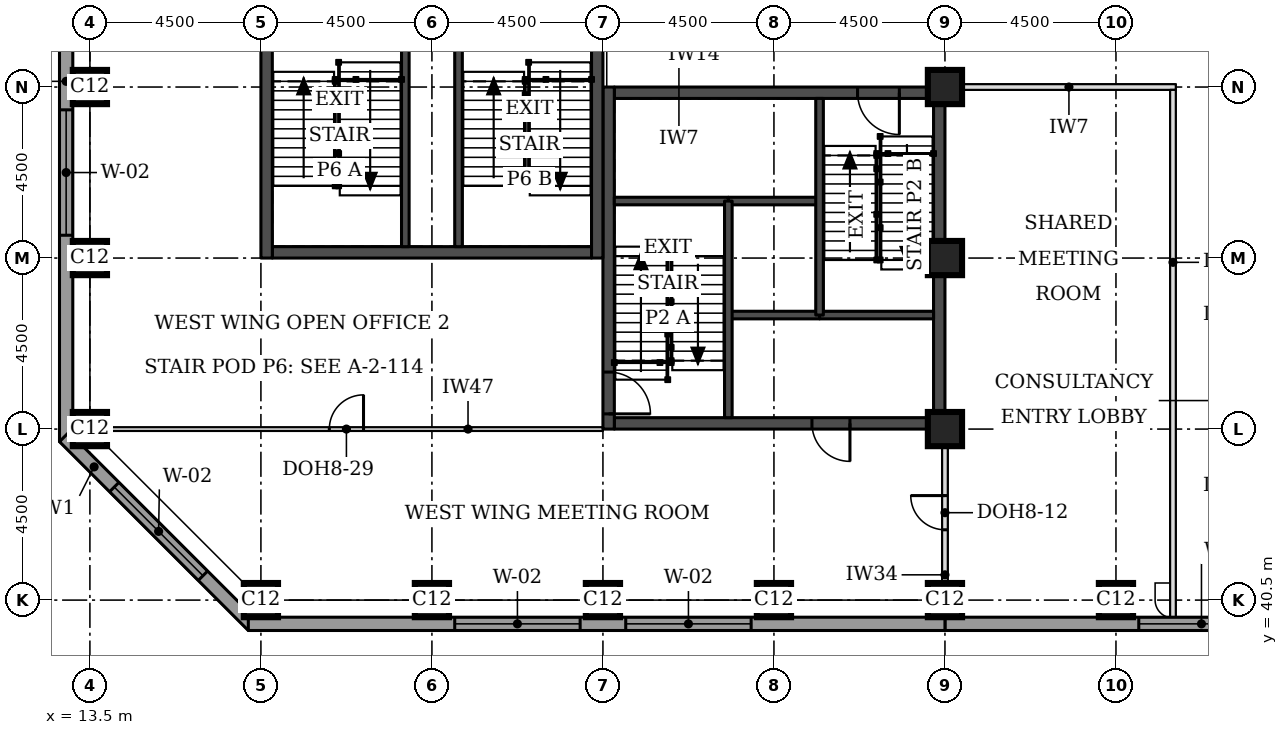
"""IFC4 building model, lengths in metres.
Left out: names, types, materials, properties, quantities, classifications, styles, units other than length and angle.
Written with IfcOpenShell. Run it as: python <this file> out.ifc"""

import sys

from ifc_helpers import new_model, si_unit, direction, frame, frame_2d, origin, origin_2d, place, context, subcontext, project, spatial, rectangle, extrude, element, fill, save


model = new_model("IFC4")
c1 = context("Model", 3, precision=1e-05, world=origin(), true_north=direction((0.0, 1.0)))
c2 = subcontext(c1, "Body", "Model", "MODEL_VIEW")
j1 = project(units=[si_unit("LENGTHUNIT", "METRE"), si_unit("PLANEANGLEUNIT", "RADIAN")], contexts=[c1])
p1 = place(None, origin())
s1 = spatial("IfcSite", under=j1, at=p1, CompositionType="ELEMENT")
p2 = place(p1, origin())
s2 = spatial("IfcBuilding", under=s1, at=p2, CompositionType="ELEMENT")
p3 = place(p2, frame((0.0, 0.0, 199.5)))
s3 = spatial("IfcBuildingStorey", under=s2, at=p3, CompositionType="ELEMENT", Elevation=199.5)
for number, where, z_axis, x_axis in (
    (1, (18.0, 40.5, 0.0), (0.0, 0.0, 1.0), (1.0, 0.0, 0.0)),
    (2, (22.5, 40.5, 0.0), (0.0, 0.0, 1.0), (1.0, 0.0, 0.0)),
    (3, (27.0, 40.5, 0.0), (0.0, 0.0, 1.0), (1.0, 0.0, 0.0)),
    (4, (31.5, 40.5, 0.0), (0.0, 0.0, 1.0), (1.0, 0.0, 0.0)),
    (5, (36.0, 40.5, 0.0), (0.0, 0.0, 1.0), (1.0, 0.0, 0.0)),
    (6, (40.5, 40.5, 0.0), (0.0, 0.0, 1.0), (1.0, 0.0, 0.0)),
    (7, (13.5, 45.0, 0.0), (0.0, 0.0, 1.0), (1.0, 0.0, 0.0)),
    (8, (36.0, 45.0, 0.0), (0.0, 0.0, 1.0), (1.0, 0.0, 0.0)),
    (9, (13.5, 49.5, 0.0), (0.0, 0.0, 1.0), (1.0, 0.0, 0.0)),
    (10, (36.0, 49.5, 0.0), (0.0, 0.0, 1.0), (1.0, 0.0, 0.0)),
    (11, (13.5, 54.0, 0.0), (0.0, 0.0, 1.0), (1.0, 0.0, 0.0)),
    (12, (36.0, 54.0, 0.0), (0.0, 0.0, 1.0), (1.0, 0.0, 0.0)),
):
    element("IfcColumn", number, at=place(p3, frame(where, z_axis=z_axis, x_axis=x_axis)), inside=s3, PredefinedType="COLUMN", context=c2, shape_type="SweptSolid", body=[
        extrude(rectangle(XDim=0.9, YDim=0.9, at=origin_2d()), origin(), (0.0, 0.0, 1.0), 3.7),
    ])
p4 = place(p3, frame((27.3, 45.15, 0.0), z_axis=(0.0, 0.0, 1.0), x_axis=(1.0, 0.0, 0.0)))
e13 = element("IfcWall", 13, at=p4, inside=s3, PredefinedType="SHEAR", context=c2, shape_type="SweptSolid", body=[
    extrude(rectangle(XDim=8.4, YDim=0.3, at=frame_2d((4.2, 0.0))), origin(), (0.0, 0.0, 1.0), 3.7),
])
p5 = place(p4, frame((5.2, 0.0, 0.0)))
e14 = element("IfcOpeningElement", 14, at=p5, cuts=e13, PredefinedType="OPENING", context=c2, shape_type="SweptSolid", body=[
    extrude(rectangle(XDim=1.0, YDim=2.1, at=frame_2d((0.5, 1.05))), frame((0.0, 0.16, 0.0), z_axis=(0.0, -1.0, 0.0), x_axis=(1.0, 0.0, 0.0)), (0.0, 0.0, 1.0), 0.32),
])
p6 = place(p3, frame((27.3, 53.85, 0.0), z_axis=(0.0, 0.0, 1.0), x_axis=(1.0, 0.0, 0.0)))
e15 = element("IfcWall", 15, at=p6, inside=s3, PredefinedType="SHEAR", context=c2, shape_type="SweptSolid", body=[
    extrude(rectangle(XDim=8.4, YDim=0.3, at=frame_2d((4.2, 0.0))), origin(), (0.0, 0.0, 1.0), 3.7),
])
p7 = place(p6, frame((6.4, 0.0, 0.0)))
e16 = element("IfcOpeningElement", 16, at=p7, cuts=e15, PredefinedType="OPENING", context=c2, shape_type="SweptSolid", body=[
    extrude(rectangle(XDim=1.1, YDim=2.1, at=frame_2d((0.55, 1.05))), frame((0.0, 0.16, 0.0), z_axis=(0.0, -1.0, 0.0), x_axis=(1.0, 0.0, 0.0)), (0.0, 0.0, 1.0), 0.32),
])
p8 = place(p3, frame((27.15, 45.0, 0.0), z_axis=(0.0, 0.0, 1.0), x_axis=(0.0, 1.0, 0.0)))
e17 = element("IfcWall", 17, at=p8, inside=s3, PredefinedType="SHEAR", context=c2, shape_type="SweptSolid", body=[
    extrude(rectangle(XDim=9.0, YDim=0.3, at=frame_2d((4.5, 0.0))), origin(), (0.0, 0.0, 1.0), 3.7),
])
p9 = place(p8, frame((0.4, 0.0, 0.0)))
e18 = element("IfcOpeningElement", 18, at=p9, cuts=e17, PredefinedType="OPENING", context=c2, shape_type="SweptSolid", body=[
    extrude(rectangle(XDim=1.1, YDim=2.1, at=frame_2d((0.55, 1.05))), frame((0.0, 0.16, 0.0), z_axis=(0.0, -1.0, 0.0), x_axis=(1.0, 0.0, 0.0)), (0.0, 0.0, 1.0), 0.32),
])
p10 = place(p3, frame((35.85, 45.0, 0.0), z_axis=(0.0, 0.0, 1.0), x_axis=(0.0, 1.0, 0.0)))
e19 = element("IfcWall", 19, at=p10, inside=s3, PredefinedType="SHEAR", context=c2, shape_type="SweptSolid", body=[
    extrude(rectangle(XDim=9.0, YDim=0.3, at=frame_2d((4.5, 0.0))), origin(), (0.0, 0.0, 1.0), 3.7),
])
p11 = place(p3, frame((18.3, 49.65, 0.0), z_axis=(0.0, 0.0, 1.0), x_axis=(1.0, 0.0, 0.0)))
e20 = element("IfcWall", 20, at=p11, inside=s3, PredefinedType="SHEAR", context=c2, shape_type="SweptSolid", body=[
    extrude(rectangle(XDim=8.4, YDim=0.3, at=frame_2d((4.2, 0.0))), origin(), (0.0, 0.0, 1.0), 3.7),
])
p12 = place(p3, frame((18.15, 49.5, 0.0), z_axis=(0.0, 0.0, 1.0), x_axis=(0.0, 1.0, 0.0)))
e21 = element("IfcWall", 21, at=p12, inside=s3, PredefinedType="SHEAR", context=c2, shape_type="SweptSolid", body=[
    extrude(rectangle(XDim=9.0, YDim=0.3, at=frame_2d((4.5, 0.0))), origin(), (0.0, 0.0, 1.0), 3.7),
])
p13 = place(p3, frame((26.85, 49.5, 0.0), z_axis=(0.0, 0.0, 1.0), x_axis=(0.0, 1.0, 0.0)))
e22 = element("IfcWall", 22, at=p13, inside=s3, PredefinedType="SHEAR", context=c2, shape_type="SweptSolid", body=[
    extrude(rectangle(XDim=9.0, YDim=0.3, at=frame_2d((4.5, 0.0))), origin(), (0.0, 0.0, 1.0), 3.7),
])
p14 = place(p13, frame((6.6, 0.0, 0.0)))
e23 = element("IfcOpeningElement", 23, at=p14, cuts=e22, PredefinedType="OPENING", context=c2, shape_type="SweptSolid", body=[
    extrude(rectangle(XDim=1.8, YDim=2.1, at=frame_2d((0.9, 1.05))), frame((0.0, 0.16, 0.0), z_axis=(0.0, -1.0, 0.0), x_axis=(1.0, 0.0, 0.0)), (0.0, 0.0, 1.0), 0.32),
])
p15 = place(p3, frame((36.0, 39.875, 0.0), z_axis=(0.0, 0.0, 1.0), x_axis=(1.0, 0.0, 0.0)))
e24 = element("IfcWall", 24, at=p15, inside=s3, PredefinedType="STANDARD", context=c2, shape_type="SweptSolid", body=[
    extrude(rectangle(XDim=36.331, YDim=0.35, at=frame_2d((18.166, 0.0))), origin(), (0.0, 0.0, 1.0), 3.525),
])
p16 = place(p15, frame((5.1, 0.0, 0.9)))
e25 = element("IfcOpeningElement", 25, at=p16, cuts=e24, PredefinedType="OPENING", context=c2, shape_type="SweptSolid", body=[
    extrude(rectangle(XDim=3.3, YDim=1.9, at=frame_2d((1.65, 0.95))), frame((0.0, 0.185, 0.0), z_axis=(0.0, -1.0, 0.0), x_axis=(1.0, 0.0, 0.0)), (0.0, 0.0, 1.0), 0.37),
])
p17 = place(p15, frame((9.6, 0.0, 0.9)))
e26 = element("IfcOpeningElement", 26, at=p17, cuts=e24, PredefinedType="OPENING", context=c2, shape_type="SweptSolid", body=[
    extrude(rectangle(XDim=3.3, YDim=1.9, at=frame_2d((1.65, 0.95))), frame((0.0, 0.185, 0.0), z_axis=(0.0, -1.0, 0.0), x_axis=(1.0, 0.0, 0.0)), (0.0, 0.0, 1.0), 0.37),
])
p18 = place(p15, frame((14.1, 0.0, 0.9)))
e27 = element("IfcOpeningElement", 27, at=p18, cuts=e24, PredefinedType="OPENING", context=c2, shape_type="SweptSolid", body=[
    extrude(rectangle(XDim=3.3, YDim=1.9, at=frame_2d((1.65, 0.95))), frame((0.0, 0.185, 0.0), z_axis=(0.0, -1.0, 0.0), x_axis=(1.0, 0.0, 0.0)), (0.0, 0.0, 1.0), 0.37),
])
p19 = place(p15, frame((18.6, 0.0, 0.9)))
e28 = element("IfcOpeningElement", 28, at=p19, cuts=e24, PredefinedType="OPENING", context=c2, shape_type="SweptSolid", body=[
    extrude(rectangle(XDim=3.3, YDim=1.9, at=frame_2d((1.65, 0.95))), frame((0.0, 0.185, 0.0), z_axis=(0.0, -1.0, 0.0), x_axis=(1.0, 0.0, 0.0)), (0.0, 0.0, 1.0), 0.37),
])
p20 = place(p15, frame((23.1, 0.0, 0.9)))
e29 = element("IfcOpeningElement", 29, at=p20, cuts=e24, PredefinedType="OPENING", context=c2, shape_type="SweptSolid", body=[
    extrude(rectangle(XDim=3.3, YDim=1.9, at=frame_2d((1.65, 0.95))), frame((0.0, 0.185, 0.0), z_axis=(0.0, -1.0, 0.0), x_axis=(1.0, 0.0, 0.0)), (0.0, 0.0, 1.0), 0.37),
])
p21 = place(p15, frame((27.6, 0.0, 0.9)))
e30 = element("IfcOpeningElement", 30, at=p21, cuts=e24, PredefinedType="OPENING", context=c2, shape_type="SweptSolid", body=[
    extrude(rectangle(XDim=3.3, YDim=1.9, at=frame_2d((1.65, 0.95))), frame((0.0, 0.185, 0.0), z_axis=(0.0, -1.0, 0.0), x_axis=(1.0, 0.0, 0.0)), (0.0, 0.0, 1.0), 0.37),
])
p22 = place(p3, frame((12.875, 58.831, 0.0), z_axis=(0.0, 0.0, 1.0), x_axis=(0.0, -1.0, 0.0)))
e31 = element("IfcWall", 31, at=p22, inside=s3, PredefinedType="STANDARD", context=c2, shape_type="SweptSolid", body=[
    extrude(rectangle(XDim=14.163, YDim=0.35, at=frame_2d((7.081, 0.0))), origin(), (0.0, 0.0, 1.0), 3.525),
])
p23 = place(p22, frame((5.431, 0.0, 0.9)))
e32 = element("IfcOpeningElement", 32, at=p23, cuts=e31, PredefinedType="OPENING", context=c2, shape_type="SweptSolid", body=[
    extrude(rectangle(XDim=3.3, YDim=1.9, at=frame_2d((1.65, 0.95))), frame((0.0, 0.185, 0.0), z_axis=(0.0, -1.0, 0.0), x_axis=(1.0, 0.0, 0.0)), (0.0, 0.0, 1.0), 0.37),
])
p24 = place(p3, frame((12.824, 44.792, 0.0), z_axis=(0.0, 0.0, 1.0), x_axis=(0.707106781187, -0.707106781187, 0.0)))
e33 = element("IfcWall", 33, at=p24, inside=s3, PredefinedType="STANDARD", context=c2, shape_type="SweptSolid", body=[
    extrude(rectangle(XDim=7.027, YDim=0.35, at=frame_2d((3.513, 0.0))), origin(), (0.0, 0.0, 1.0), 3.525),
])
p25 = place(p24, frame((1.863, 0.0, 0.9)))
e34 = element("IfcOpeningElement", 34, at=p25, cuts=e33, PredefinedType="OPENING", context=c2, shape_type="SweptSolid", body=[
    extrude(rectangle(XDim=3.3, YDim=1.9, at=frame_2d((1.65, 0.95))), frame((0.0, 0.185, 0.0), z_axis=(0.0, -1.0, 0.0), x_axis=(1.0, 0.0, 0.0)), (0.0, 0.0, 1.0), 0.37),
])
p26 = place(p3, frame((17.669, 39.875, 0.0), z_axis=(0.0, 0.0, 1.0), x_axis=(1.0, 0.0, 0.0)))
e35 = element("IfcWall", 35, at=p26, inside=s3, PredefinedType="STANDARD", context=c2, shape_type="SweptSolid", body=[
    extrude(rectangle(XDim=18.331, YDim=0.35, at=frame_2d((9.166, 0.0))), origin(), (0.0, 0.0, 1.0), 3.525),
])
p27 = place(p26, frame((5.431, 0.0, 0.9)))
e36 = element("IfcOpeningElement", 36, at=p27, cuts=e35, PredefinedType="OPENING", context=c2, shape_type="SweptSolid", body=[
    extrude(rectangle(XDim=3.3, YDim=1.9, at=frame_2d((1.65, 0.95))), frame((0.0, 0.185, 0.0), z_axis=(0.0, -1.0, 0.0), x_axis=(1.0, 0.0, 0.0)), (0.0, 0.0, 1.0), 0.37),
])
p28 = place(p26, frame((9.931, 0.0, 0.9)))
e37 = element("IfcOpeningElement", 37, at=p28, cuts=e35, PredefinedType="OPENING", context=c2, shape_type="SweptSolid", body=[
    extrude(rectangle(XDim=3.3, YDim=1.9, at=frame_2d((1.65, 0.95))), frame((0.0, 0.185, 0.0), z_axis=(0.0, -1.0, 0.0), x_axis=(1.0, 0.0, 0.0)), (0.0, 0.0, 1.0), 0.37),
])
p29 = place(p3, frame((36.45, 54.0, 0.0), z_axis=(0.0, 0.0, 1.0), x_axis=(1.0, 0.0, 0.0)))
e38 = element("IfcWall", 38, at=p29, inside=s3, PredefinedType="PARTITIONING", context=c2, shape_type="SweptSolid", body=[
    extrude(rectangle(XDim=5.625, YDim=0.15, at=frame_2d((2.812, 0.0))), origin(), (0.0, 0.0, 1.0), 3.55),
])
p30 = place(p3, frame((42.0, 40.05, 0.0), z_axis=(0.0, 0.0, 1.0), x_axis=(0.0, 1.0, 0.0)))
e39 = element("IfcWall", 39, at=p30, inside=s3, PredefinedType="PARTITIONING", context=c2, shape_type="SweptSolid", body=[
    extrude(rectangle(XDim=13.875, YDim=0.15, at=frame_2d((6.938, 0.0))), origin(), (0.0, 0.0, 1.0), 3.55),
])
p31 = place(p3, frame((36.0, 40.95, 0.0), z_axis=(0.0, 0.0, 1.0), x_axis=(0.0, 1.0, 0.0)))
e40 = element("IfcWall", 40, at=p31, inside=s3, PredefinedType="PARTITIONING", context=c2, shape_type="SweptSolid", body=[
    extrude(rectangle(XDim=3.63, YDim=0.15, at=frame_2d((1.815, 0.0))), origin(), (0.0, 0.0, 1.0), 2.8),
])
p32 = place(p31, frame((1.4, 0.0, 0.0)))
e41 = element("IfcOpeningElement", 41, at=p32, cuts=e40, PredefinedType="OPENING", context=c2, shape_type="SweptSolid", body=[
    extrude(rectangle(XDim=0.9, YDim=2.1, at=frame_2d((0.45, 1.05))), frame((0.0, 0.085, 0.0), z_axis=(0.0, -1.0, 0.0), x_axis=(1.0, 0.0, 0.0)), (0.0, 0.0, 1.0), 0.17),
])
p33 = place(p3, frame((27.0, 45.0, 0.0), z_axis=(0.0, 0.0, 1.0), x_axis=(-1.0, 0.0, 0.0)))
e42 = element("IfcWall", 42, at=p33, inside=s3, PredefinedType="PARTITIONING", context=c2, shape_type="SweptSolid", body=[
    extrude(rectangle(XDim=13.5, YDim=0.1, at=frame_2d((6.75, 0.0))), origin(), (0.0, 0.0, 1.0), 2.55),
])
p34 = place(p33, frame((6.3, 0.0, 0.0)))
e43 = element("IfcOpeningElement", 43, at=p34, cuts=e42, PredefinedType="OPENING", context=c2, shape_type="SweptSolid", body=[
    extrude(rectangle(XDim=0.9, YDim=2.1, at=frame_2d((0.45, 1.05))), frame((0.0, 0.06, 0.0), z_axis=(0.0, -1.0, 0.0), x_axis=(1.0, 0.0, 0.0)), (0.0, 0.0, 1.0), 0.12),
])
p35 = place(p3, frame((30.3, 48.0, 0.0), z_axis=(0.0, 0.0, 1.0), x_axis=(1.0, 0.0, 0.0)))
e44 = element("IfcWall", 44, at=p35, inside=s3, PredefinedType="SOLIDWALL", context=c2, shape_type="SweptSolid", body=[
    extrude(rectangle(XDim=2.4, YDim=0.2, at=frame_2d((1.2, 0.0))), origin(), (0.0, 0.0, 1.0), 3.55),
])
p36 = place(p3, frame((32.7, 48.0, 0.0), z_axis=(0.0, 0.0, 1.0), x_axis=(1.0, 0.0, 0.0)))
e45 = element("IfcWall", 45, at=p36, inside=s3, PredefinedType="SOLIDWALL", context=c2, shape_type="SweptSolid", body=[
    extrude(rectangle(XDim=3.0, YDim=0.2, at=frame_2d((1.5, 0.0))), origin(), (0.0, 0.0, 1.0), 3.55),
])
p37 = place(p3, frame((30.3, 51.0, 0.0), z_axis=(0.0, 0.0, 1.0), x_axis=(1.0, 0.0, 0.0)))
e46 = element("IfcWall", 46, at=p37, inside=s3, PredefinedType="SOLIDWALL", context=c2, shape_type="SweptSolid", body=[
    extrude(rectangle(XDim=2.4, YDim=0.2, at=frame_2d((1.2, 0.0))), origin(), (0.0, 0.0, 1.0), 3.7),
])
p38 = place(p3, frame((27.3, 51.0, 0.0), z_axis=(0.0, 0.0, 1.0), x_axis=(1.0, 0.0, 0.0)))
e47 = element("IfcWall", 47, at=p38, inside=s3, PredefinedType="SOLIDWALL", context=c2, shape_type="SweptSolid", body=[
    extrude(rectangle(XDim=3.0, YDim=0.2, at=frame_2d((1.5, 0.0))), origin(), (0.0, 0.0, 1.0), 3.55),
])
for number, where, z_axis, x_axis in (
    (48, (30.3, 45.3, 0.0), (0.0, 0.0, 1.0), (0.0, 1.0, 0.0)),
    (49, (32.7, 48.0, 0.0), (0.0, 0.0, 1.0), (0.0, 1.0, 0.0)),
):
    element("IfcWall", number, at=place(p3, frame(where, z_axis=z_axis, x_axis=x_axis)), inside=s3, PredefinedType="SOLIDWALL", context=c2, shape_type="SweptSolid", body=[
        extrude(rectangle(XDim=5.7, YDim=0.2, at=frame_2d((2.85, 0.0))), origin(), (0.0, 0.0, 1.0), 3.55),
    ])
for number, where, z_axis, x_axis in (
    (50, (21.8, 49.8, 0.0), (0.0, 0.0, 1.0), (0.0, 1.0, 0.0)),
    (51, (23.2, 49.8, 0.0), (0.0, 0.0, 1.0), (0.0, 1.0, 0.0)),
):
    element("IfcWall", number, at=place(p3, frame(where, z_axis=z_axis, x_axis=x_axis)), inside=s3, PredefinedType="SOLIDWALL", context=c2, shape_type="SweptSolid", body=[
        extrude(rectangle(XDim=6.05, YDim=0.2, at=frame_2d((3.025, 0.0))), origin(), (0.0, 0.0, 1.0), 3.55),
    ])
p39 = place(p16, origin())
e52 = element("IfcWindow", 52, at=p39, inside=s3, PartitioningType="SINGLE_PANEL", PredefinedType="WINDOW", context=c2, shape_type="SweptSolid", body=[
    extrude(rectangle(XDim=3.3, YDim=1.9, at=frame_2d((1.65, 0.95))), frame((0.0, 0.085, 0.0), z_axis=(0.0, -1.0, 0.0), x_axis=(1.0, 0.0, 0.0)), (0.0, 0.0, 1.0), 0.06),
])
fill(e25, e52)
p40 = place(p23, origin())
e53 = element("IfcWindow", 53, at=p40, inside=s3, PartitioningType="SINGLE_PANEL", PredefinedType="WINDOW", context=c2, shape_type="SweptSolid", body=[
    extrude(rectangle(XDim=3.3, YDim=1.9, at=frame_2d((1.65, 0.95))), frame((0.0, 0.085, 0.0), z_axis=(0.0, -1.0, 0.0), x_axis=(1.0, 0.0, 0.0)), (0.0, 0.0, 1.0), 0.06),
])
fill(e32, e53)
p41 = place(p25, origin())
e54 = element("IfcWindow", 54, at=p41, inside=s3, PartitioningType="SINGLE_PANEL", PredefinedType="WINDOW", context=c2, shape_type="SweptSolid", body=[
    extrude(rectangle(XDim=3.3, YDim=1.9, at=frame_2d((1.65, 0.95))), frame((0.0, 0.085, 0.0), z_axis=(0.0, -1.0, 0.0), x_axis=(1.0, 0.0, 0.0)), (0.0, 0.0, 1.0), 0.06),
])
fill(e34, e54)
p42 = place(p27, origin())
e55 = element("IfcWindow", 55, at=p42, inside=s3, PartitioningType="SINGLE_PANEL", PredefinedType="WINDOW", context=c2, shape_type="SweptSolid", body=[
    extrude(rectangle(XDim=3.3, YDim=1.9, at=frame_2d((1.65, 0.95))), frame((0.0, 0.085, 0.0), z_axis=(0.0, -1.0, 0.0), x_axis=(1.0, 0.0, 0.0)), (0.0, 0.0, 1.0), 0.06),
])
fill(e36, e55)
p43 = place(p28, origin())
e56 = element("IfcWindow", 56, at=p43, inside=s3, PartitioningType="SINGLE_PANEL", PredefinedType="WINDOW", context=c2, shape_type="SweptSolid", body=[
    extrude(rectangle(XDim=3.3, YDim=1.9, at=frame_2d((1.65, 0.95))), frame((0.0, 0.085, 0.0), z_axis=(0.0, -1.0, 0.0), x_axis=(1.0, 0.0, 0.0)), (0.0, 0.0, 1.0), 0.06),
])
fill(e37, e56)
p44 = place(p32, origin())
e57 = element("IfcDoor", 57, at=p44, inside=s3, OperationType="SINGLE_SWING_RIGHT", PredefinedType="DOOR", context=c2, shape_type="SweptSolid", body=[
    extrude(rectangle(XDim=0.9, YDim=2.1, at=frame_2d((0.45, 1.05))), frame((0.0, 0.025, 0.0), z_axis=(0.0, -1.0, 0.0), x_axis=(1.0, 0.0, 0.0)), (0.0, 0.0, 1.0), 0.05),
])
fill(e41, e57)
p45 = place(p34, frame((0.9, 0.0, 0.0), z_axis=(0.0, 0.0, 1.0), x_axis=(-1.0, 0.0, 0.0)))
e58 = element("IfcDoor", 58, at=p45, inside=s3, OperationType="SINGLE_SWING_RIGHT", PredefinedType="DOOR", context=c2, shape_type="SweptSolid", body=[
    extrude(rectangle(XDim=0.9, YDim=2.1, at=frame_2d((0.45, 1.05))), frame((0.0, 0.025, 0.0), z_axis=(0.0, -1.0, 0.0), x_axis=(1.0, 0.0, 0.0)), (0.0, 0.0, 1.0), 0.05),
])
fill(e43, e58)
p46 = place(p9, frame((1.1, 0.0, 0.0), z_axis=(0.0, 0.0, 1.0), x_axis=(-1.0, 0.0, 0.0)))
e59 = element("IfcDoor", 59, at=p46, inside=s3, OperationType="SINGLE_SWING_RIGHT", PredefinedType="DOOR", context=c2, shape_type="SweptSolid", body=[
    extrude(rectangle(XDim=1.1, YDim=2.1, at=frame_2d((0.55, 1.05))), frame((0.0, 0.025, 0.0), z_axis=(0.0, -1.0, 0.0), x_axis=(1.0, 0.0, 0.0)), (0.0, 0.0, 1.0), 0.05),
])
fill(e18, e59)
p47 = place(p7, frame((1.1, 0.0, 0.0), z_axis=(0.0, 0.0, 1.0), x_axis=(-1.0, 0.0, 0.0)))
e60 = element("IfcDoor", 60, at=p47, inside=s3, OperationType="SINGLE_SWING_LEFT", PredefinedType="DOOR", context=c2, shape_type="SweptSolid", body=[
    extrude(rectangle(XDim=1.1, YDim=2.1, at=frame_2d((0.55, 1.05))), frame((0.0, 0.025, 0.0), z_axis=(0.0, -1.0, 0.0), x_axis=(1.0, 0.0, 0.0)), (0.0, 0.0, 1.0), 0.05),
])
fill(e16, e60)
p48 = place(p5, frame((1.0, 0.0, 0.0), z_axis=(0.0, 0.0, 1.0), x_axis=(-1.0, 0.0, 0.0)))
e61 = element("IfcDoor", 61, at=p48, inside=s3, OperationType="SINGLE_SWING_LEFT", PredefinedType="DOOR", context=c2, shape_type="SweptSolid", body=[
    extrude(rectangle(XDim=1.0, YDim=2.1, at=frame_2d((0.5, 1.05))), frame((0.0, 0.025, 0.0), z_axis=(0.0, -1.0, 0.0), x_axis=(1.0, 0.0, 0.0)), (0.0, 0.0, 1.0), 0.05),
])
fill(e14, e61)
save(model, sys.argv[1])
